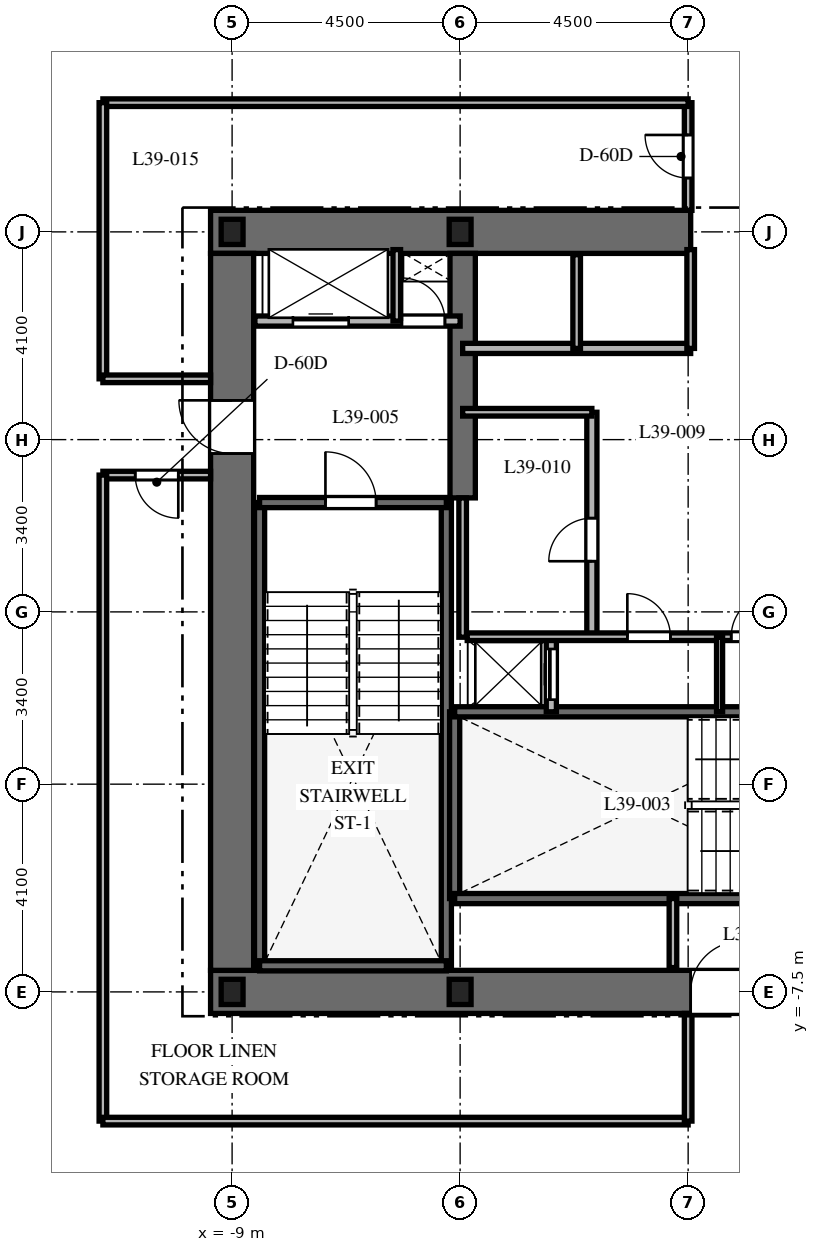
"""IFC4 building model, lengths in metres.
Left out: names, types, materials, properties, quantities, classifications, styles, units other than length and angle.
Written with IfcOpenShell. Run it as: python <this file> out.ifc"""

import sys

from ifc_helpers import new_model, si_unit, direction, frame, frame_2d, origin, origin_2d, place, context, subcontext, project, spatial, rectangle, i_section, extrude, element, fill, save


model = new_model("IFC4")
c1 = context("Model", 3, precision=1e-05, world=origin(), true_north=direction((0.0, 1.0)))
c2 = subcontext(c1, "Body", "Model", "MODEL_VIEW")
j1 = project(units=[si_unit("LENGTHUNIT", "METRE"), si_unit("PLANEANGLEUNIT", "RADIAN")], contexts=[c1])
p1 = place(None, origin())
s1 = spatial("IfcSite", under=j1, at=p1, CompositionType="ELEMENT")
p2 = place(p1, origin())
s2 = spatial("IfcBuilding", under=s1, at=p2, CompositionType="ELEMENT")
p3 = place(p2, frame((0.0, 0.0, 159.1)))
s3 = spatial("IfcBuildingStorey", under=s2, at=p3, CompositionType="ELEMENT", Elevation=159.1)
p4 = place(p3, frame((-9.425, -7.5, 0.0), z_axis=(0.0, 0.0, 1.0), x_axis=(1.0, 0.0, 0.0)))
e1 = element("IfcWall", 1, at=p4, inside=s3, PredefinedType="SHEAR", context=c2, shape_type="SweptSolid", body=[
    extrude(rectangle(XDim=18.85, YDim=0.85, at=frame_2d((9.425, 0.0))), origin(), (0.0, 0.0, 1.0), 3.7),
])
p5 = place(p4, frame((9.475, 0.0, 0.0)))
e2 = element("IfcOpeningElement", 2, at=p5, cuts=e1, PredefinedType="OPENING", context=c2, shape_type="SweptSolid", body=[
    extrude(rectangle(XDim=1.0, YDim=2.15, at=frame_2d((0.5, 1.075))), frame((0.0, 0.435, 0.0), z_axis=(0.0, -1.0, 0.0), x_axis=(1.0, 0.0, 0.0)), (0.0, 0.0, 1.0), 0.87),
])
p6 = place(p3, frame((-9.425, 7.5, 0.0), z_axis=(0.0, 0.0, 1.0), x_axis=(1.0, 0.0, 0.0)))
e3 = element("IfcWall", 3, at=p6, inside=s3, PredefinedType="SHEAR", context=c2, shape_type="SweptSolid", body=[
    extrude(rectangle(XDim=9.475, YDim=0.85, at=frame_2d((4.738, 0.0))), origin(), (0.0, 0.0, 1.0), 3.7),
])
p7 = place(p3, frame((-9.0, -7.075, 0.0), z_axis=(0.0, 0.0, 1.0), x_axis=(0.0, 1.0, 0.0)))
e4 = element("IfcWall", 4, at=p7, inside=s3, PredefinedType="SHEAR", context=c2, shape_type="SweptSolid", body=[
    extrude(rectangle(XDim=14.15, YDim=0.85, at=frame_2d((7.075, 0.0))), origin(), (0.0, 0.0, 1.0), 3.7),
])
p8 = place(p7, frame((10.2, 0.0, 0.0)))
e5 = element("IfcOpeningElement", 5, at=p8, cuts=e4, PredefinedType="OPENING", context=c2, shape_type="SweptSolid", body=[
    extrude(rectangle(XDim=1.05, YDim=2.15, at=frame_2d((0.525, 1.075))), frame((0.0, 0.435, 0.0), z_axis=(0.0, -1.0, 0.0), x_axis=(1.0, 0.0, 0.0)), (0.0, 0.0, 1.0), 0.87),
])
p9 = place(p3, frame((-4.45, 2.25, 0.0), z_axis=(0.0, 0.0, 1.0), x_axis=(0.0, 1.0, 0.0)))
e6 = element("IfcWall", 6, at=p9, inside=s3, PredefinedType="SHEAR", context=c2, shape_type="SweptSolid", body=[
    extrude(rectangle(XDim=4.825, YDim=0.5, at=frame_2d((2.413, 0.0))), origin(), (0.0, 0.0, 1.0), 3.7),
])
for number, where, z_axis, x_axis in (
    (7, (-8.458, -6.985, 0.0), (0.0, 0.0, 1.0), (0.0, 1.0, 0.0)),
    (8, (-4.772, -6.985, 0.0), (0.0, 0.0, 1.0), (0.0, 1.0, 0.0)),
):
    element("IfcWall", number, at=place(p3, frame(where, z_axis=z_axis, x_axis=x_axis)), inside=s3, PredefinedType="SHEAR", context=c2, shape_type="SweptSolid", body=[
        extrude(rectangle(XDim=9.143, YDim=0.2, at=frame_2d((4.572, 0.0))), origin(), (0.0, 0.0, 1.0), 3.7),
    ])
p10 = place(p3, frame((-8.458, -6.985, 0.0), z_axis=(0.0, 0.0, 1.0), x_axis=(1.0, 0.0, 0.0)))
e9 = element("IfcWall", 9, at=p10, inside=s3, PredefinedType="SHEAR", context=c2, shape_type="SweptSolid", body=[
    extrude(rectangle(XDim=3.686, YDim=0.2, at=frame_2d((1.843, 0.0))), origin(), (0.0, 0.0, 1.0), 3.7),
])
p11 = place(p3, frame((-8.458, 2.158, 0.0), z_axis=(0.0, 0.0, 1.0), x_axis=(1.0, 0.0, 0.0)))
e10 = element("IfcWall", 10, at=p11, inside=s3, PredefinedType="SHEAR", context=c2, shape_type="SweptSolid", body=[
    extrude(rectangle(XDim=3.686, YDim=0.2, at=frame_2d((1.843, 0.0))), origin(), (0.0, 0.0, 1.0), 3.7),
])
p12 = place(p11, frame((1.3, 0.0, 0.0)))
e11 = element("IfcOpeningElement", 11, at=p12, cuts=e10, PredefinedType="OPENING", context=c2, shape_type="SweptSolid", body=[
    extrude(rectangle(XDim=1.0, YDim=2.15, at=frame_2d((0.5, 1.075))), frame((0.0, 0.11, 0.0), z_axis=(0.0, -1.0, 0.0), x_axis=(1.0, 0.0, 0.0)), (0.0, 0.0, 1.0), 0.22),
])
p13 = place(p3, frame((-4.608, -5.658, 0.0), z_axis=(0.0, 0.0, 1.0), x_axis=(0.0, 1.0, 0.0)))
e12 = element("IfcWall", 12, at=p13, inside=s3, PredefinedType="SHEAR", context=c2, shape_type="SweptSolid", body=[
    extrude(rectangle(XDim=3.686, YDim=0.2, at=frame_2d((1.843, 0.0))), origin(), (0.0, 0.0, 1.0), 3.7),
])
p14 = place(p3, frame((-4.608, -5.658, 0.0), z_axis=(0.0, 0.0, 1.0), x_axis=(1.0, 0.0, 0.0)))
e13 = element("IfcWall", 13, at=p14, inside=s3, PredefinedType="SHEAR", context=c2, shape_type="SweptSolid", body=[
    extrude(rectangle(XDim=9.166, YDim=0.2, at=frame_2d((4.583, 0.0))), origin(), (0.0, 0.0, 1.0), 3.7),
])
p15 = place(p14, frame((7.45, 0.0, 0.0)))
e14 = element("IfcOpeningElement", 14, at=p15, cuts=e13, PredefinedType="OPENING", context=c2, shape_type="SweptSolid", body=[
    extrude(rectangle(XDim=1.0, YDim=2.15, at=frame_2d((0.5, 1.075))), frame((0.0, 0.11, 0.0), z_axis=(0.0, -1.0, 0.0), x_axis=(1.0, 0.0, 0.0)), (0.0, 0.0, 1.0), 0.22),
])
p16 = place(p3, frame((-4.608, -1.972, 0.0), z_axis=(0.0, 0.0, 1.0), x_axis=(1.0, 0.0, 0.0)))
e15 = element("IfcWall", 15, at=p16, inside=s3, PredefinedType="SHEAR", context=c2, shape_type="SweptSolid", body=[
    extrude(rectangle(XDim=9.166, YDim=0.2, at=frame_2d((4.583, 0.0))), origin(), (0.0, 0.0, 1.0), 3.7),
])
for number, where, z_axis, x_axis in (
    (16, (-9.0, -7.5, 0.0), (0.0, 0.0, 1.0), (1.0, 0.0, 0.0)),
    (17, (-4.5, -7.5, 0.0), (0.0, 0.0, 1.0), (1.0, 0.0, 0.0)),
    (18, (-4.5, 7.5, 0.0), (0.0, 0.0, 1.0), (1.0, 0.0, 0.0)),
    (19, (-9.0, 7.5, 0.0), (0.0, 0.0, 1.0), (1.0, 0.0, 0.0)),
):
    element("IfcColumn", number, at=place(p3, frame(where, z_axis=z_axis, x_axis=x_axis)), inside=s3, PredefinedType="COLUMN", context=c2, shape_type="SweptSolid", body=[
        extrude(i_section(OverallWidth=0.432, OverallDepth=0.498, WebThickness=0.056, FlangeThickness=0.089, at=origin_2d()), origin(), (0.0, 0.0, 1.0), 3.7),
    ])
p17 = place(p3, frame((-0.3, -7.02, 0.0), z_axis=(0.0, 0.0, 1.0), x_axis=(0.0, 1.0, 0.0)))
e20 = element("IfcWall", 20, at=p17, inside=s3, PredefinedType="PARTITIONING", context=c2, shape_type="SweptSolid", body=[
    extrude(rectangle(XDim=1.362, YDim=0.15, at=frame_2d((0.681, 0.0))), origin(), (0.0, 0.0, 1.0), 3.4),
])
p18 = place(p3, frame((-8.55, 5.74, 0.0), z_axis=(0.0, 0.0, 1.0), x_axis=(1.0, 0.0, 0.0)))
e21 = element("IfcWall", 21, at=p18, inside=s3, PredefinedType="PARTITIONING", context=c2, shape_type="SweptSolid", body=[
    extrude(rectangle(XDim=4.05, YDim=0.2, at=frame_2d((2.025, 0.0))), origin(), (0.0, 0.0, 1.0), 3.4),
])
p19 = place(p18, frame((0.75, 0.0, 0.0)))
e22 = element("IfcOpeningElement", 22, at=p19, cuts=e21, PredefinedType="OPENING", context=c2, shape_type="SweptSolid", body=[
    extrude(rectangle(XDim=1.1, YDim=2.2, at=frame_2d((0.55, 1.1))), frame((0.0, 0.11, 0.0), z_axis=(0.0, -1.0, 0.0), x_axis=(1.0, 0.0, 0.0)), (0.0, 0.0, 1.0), 0.22),
])
p20 = place(p18, frame((2.9, 0.0, 0.0)))
e23 = element("IfcOpeningElement", 23, at=p20, cuts=e21, PredefinedType="OPENING", context=c2, shape_type="SweptSolid", body=[
    extrude(rectangle(XDim=0.85, YDim=2.03, at=frame_2d((0.425, 1.015))), frame((0.0, 0.11, 0.0), z_axis=(0.0, -1.0, 0.0), x_axis=(1.0, 0.0, 0.0)), (0.0, 0.0, 1.0), 0.22),
])
p21 = place(p3, frame((-5.75, 5.74, 0.0), z_axis=(0.0, 0.0, 1.0), x_axis=(0.0, 1.0, 0.0)))
e24 = element("IfcWall", 24, at=p21, inside=s3, PredefinedType="PARTITIONING", context=c2, shape_type="SweptSolid", body=[
    extrude(rectangle(XDim=1.41, YDim=0.15, at=frame_2d((0.705, 0.0))), origin(), (0.0, 0.0, 1.0), 3.4),
])
p22 = place(p3, frame((-2.7, -1.972, 0.0), z_axis=(0.0, 0.0, 1.0), x_axis=(0.0, 1.0, 0.0)))
e25 = element("IfcWall", 25, at=p22, inside=s3, PredefinedType="PARTITIONING", context=c2, shape_type="SweptSolid", body=[
    extrude(rectangle(XDim=1.472, YDim=0.2, at=frame_2d((0.736, 0.0))), origin(), (0.0, 0.0, 1.0), 3.4),
])
p23 = place(p22, frame((0.24, 0.0, 0.0)))
e26 = element("IfcOpeningElement", 26, at=p23, cuts=e25, PredefinedType="OPENING", context=c2, shape_type="SweptSolid", body=[
    extrude(rectangle(XDim=1.0, YDim=2.2, at=frame_2d((0.5, 1.1))), frame((0.0, 0.11, 0.0), z_axis=(0.0, -1.0, 0.0), x_axis=(1.0, 0.0, 0.0)), (0.0, 0.0, 1.0), 0.22),
])
p24 = place(p3, frame((-4.45, 5.2, 0.0), z_axis=(0.0, 0.0, 1.0), x_axis=(1.0, 0.0, 0.0)))
e27 = element("IfcWall", 27, at=p24, inside=s3, PredefinedType="PARTITIONING", context=c2, shape_type="SweptSolid", body=[
    extrude(rectangle(XDim=4.5, YDim=0.2, at=frame_2d((2.25, 0.0))), origin(), (0.0, 0.0, 1.0), 3.4),
])
p25 = place(p3, frame((-2.2, 5.2, 0.0), z_axis=(0.0, 0.0, 1.0), x_axis=(0.0, 1.0, 0.0)))
e28 = element("IfcWall", 28, at=p25, inside=s3, PredefinedType="PARTITIONING", context=c2, shape_type="SweptSolid", body=[
    extrude(rectangle(XDim=1.85, YDim=0.15, at=frame_2d((0.925, 0.0))), origin(), (0.0, 0.0, 1.0), 3.4),
])
p26 = place(p3, frame((0.05, 5.2, 0.0), z_axis=(0.0, 0.0, 1.0), x_axis=(0.0, 1.0, 0.0)))
e29 = element("IfcWall", 29, at=p26, inside=s3, PredefinedType="PARTITIONING", context=c2, shape_type="SweptSolid", body=[
    extrude(rectangle(XDim=1.95, YDim=0.15, at=frame_2d((0.975, 0.0))), origin(), (0.0, 0.0, 1.0), 3.4),
])
p27 = place(p3, frame((-4.45, -0.5, 0.0), z_axis=(0.0, 0.0, 1.0), x_axis=(0.0, 1.0, 0.0)))
e30 = element("IfcWall", 30, at=p27, inside=s3, PredefinedType="PARTITIONING", context=c2, shape_type="SweptSolid", body=[
    extrude(rectangle(XDim=2.75, YDim=0.15, at=frame_2d((1.375, 0.0))), origin(), (0.0, 0.0, 1.0), 3.4),
])
p28 = place(p3, frame((-1.9, -0.5, 0.0), z_axis=(0.0, 0.0, 1.0), x_axis=(0.0, 1.0, 0.0)))
e31 = element("IfcWall", 31, at=p28, inside=s3, PredefinedType="PARTITIONING", context=c2, shape_type="SweptSolid", body=[
    extrude(rectangle(XDim=4.44, YDim=0.2, at=frame_2d((2.22, 0.0))), origin(), (0.0, 0.0, 1.0), 3.4),
])
p29 = place(p28, frame((1.5, 0.0, 0.0)))
e32 = element("IfcOpeningElement", 32, at=p29, cuts=e31, PredefinedType="OPENING", context=c2, shape_type="SweptSolid", body=[
    extrude(rectangle(XDim=0.85, YDim=2.03, at=frame_2d((0.425, 1.015))), frame((0.0, 0.11, 0.0), z_axis=(0.0, -1.0, 0.0), x_axis=(1.0, 0.0, 0.0)), (0.0, 0.0, 1.0), 0.22),
])
p30 = place(p3, frame((-4.45, 3.94, 0.0), z_axis=(0.0, 0.0, 1.0), x_axis=(1.0, 0.0, 0.0)))
e33 = element("IfcWall", 33, at=p30, inside=s3, PredefinedType="PARTITIONING", context=c2, shape_type="SweptSolid", body=[
    extrude(rectangle(XDim=2.55, YDim=0.15, at=frame_2d((1.275, 0.0))), origin(), (0.0, 0.0, 1.0), 3.4),
])
p31 = place(p3, frame((-4.36, -0.49, 0.0), z_axis=(0.0, 0.0, 1.0), x_axis=(1.0, 0.0, 0.0)))
e34 = element("IfcWall", 34, at=p31, inside=s3, PredefinedType="PARTITIONING", context=c2, shape_type="SweptSolid", body=[
    extrude(rectangle(XDim=8.72, YDim=0.15, at=frame_2d((4.36, 0.0))), origin(), (0.0, 0.0, 1.0), 3.4),
])
p32 = place(p31, frame((3.16, 0.0, 0.0)))
e35 = element("IfcOpeningElement", 35, at=p32, cuts=e34, PredefinedType="OPENING", context=c2, shape_type="SweptSolid", body=[
    extrude(rectangle(XDim=0.85, YDim=2.03, at=frame_2d((0.425, 1.015))), frame((0.0, 0.085, 0.0), z_axis=(0.0, -1.0, 0.0), x_axis=(1.0, 0.0, 0.0)), (0.0, 0.0, 1.0), 0.17),
])
p33 = place(p31, frame((5.21, 0.0, 0.0)))
e36 = element("IfcOpeningElement", 36, at=p33, cuts=e34, PredefinedType="OPENING", context=c2, shape_type="SweptSolid", body=[
    extrude(rectangle(XDim=0.85, YDim=2.03, at=frame_2d((0.425, 1.015))), frame((0.0, 0.085, 0.0), z_axis=(0.0, -1.0, 0.0), x_axis=(1.0, 0.0, 0.0)), (0.0, 0.0, 1.0), 0.17),
])
p34 = place(p3, frame((0.62, -1.972, 0.0), z_axis=(0.0, 0.0, 1.0), x_axis=(0.0, 1.0, 0.0)))
e37 = element("IfcWall", 37, at=p34, inside=s3, PredefinedType="PARTITIONING", context=c2, shape_type="SweptSolid", body=[
    extrude(rectangle(XDim=1.472, YDim=0.12, at=frame_2d((0.736, 0.0))), origin(), (0.0, 0.0, 1.0), 3.4),
])
p35 = place(p3, frame((0.0, 7.925, 0.0), z_axis=(0.0, 0.0, 1.0), x_axis=(0.0, 1.0, 0.0)))
e38 = element("IfcWall", 38, at=p35, inside=s3, PredefinedType="PARTITIONING", context=c2, shape_type="SweptSolid", body=[
    extrude(rectangle(XDim=2.125, YDim=0.15, at=frame_2d((1.062, 0.0))), origin(), (0.0, 0.0, 1.0), 3.4),
])
p36 = place(p35, frame((0.638, 0.0, 0.0)))
e39 = element("IfcOpeningElement", 39, at=p36, cuts=e38, PredefinedType="OPENING", context=c2, shape_type="SweptSolid", body=[
    extrude(rectangle(XDim=0.85, YDim=2.03, at=frame_2d((0.425, 1.015))), frame((0.0, 0.085, 0.0), z_axis=(0.0, -1.0, 0.0), x_axis=(1.0, 0.0, 0.0)), (0.0, 0.0, 1.0), 0.17),
])
p37 = place(p3, frame((0.0, 10.05, 0.0), z_axis=(0.0, 0.0, 1.0), x_axis=(-1.0, 0.0, 0.0)))
e40 = element("IfcWall", 40, at=p37, inside=s3, PredefinedType="PARTITIONING", context=c2, shape_type="SweptSolid", body=[
    extrude(rectangle(XDim=11.55, YDim=0.15, at=frame_2d((5.775, 0.0))), origin(), (0.0, 0.0, 1.0), 2.84),
])
p38 = place(p3, frame((-11.55, 10.05, 0.0), z_axis=(0.0, 0.0, 1.0), x_axis=(0.0, -1.0, 0.0)))
e41 = element("IfcWall", 41, at=p38, inside=s3, PredefinedType="PARTITIONING", context=c2, shape_type="SweptSolid", body=[
    extrude(rectangle(XDim=5.45, YDim=0.15, at=frame_2d((2.725, 0.0))), origin(), (0.0, 0.0, 1.0), 2.84),
])
p39 = place(p3, frame((-11.55, 4.6, 0.0), z_axis=(0.0, 0.0, 1.0), x_axis=(1.0, 0.0, 0.0)))
e42 = element("IfcWall", 42, at=p39, inside=s3, PredefinedType="PARTITIONING", context=c2, shape_type="SweptSolid", body=[
    extrude(rectangle(XDim=2.125, YDim=0.15, at=frame_2d((1.062, 0.0))), origin(), (0.0, 0.0, 1.0), 3.4),
])
p40 = place(p3, frame((-9.425, 2.7, 0.0), z_axis=(0.0, 0.0, 1.0), x_axis=(-1.0, 0.0, 0.0)))
e43 = element("IfcWall", 43, at=p40, inside=s3, PredefinedType="PARTITIONING", context=c2, shape_type="SweptSolid", body=[
    extrude(rectangle(XDim=2.125, YDim=0.15, at=frame_2d((1.062, 0.0))), origin(), (0.0, 0.0, 1.0), 3.4),
])
p41 = place(p40, frame((0.637, 0.0, 0.0)))
e44 = element("IfcOpeningElement", 44, at=p41, cuts=e43, PredefinedType="OPENING", context=c2, shape_type="SweptSolid", body=[
    extrude(rectangle(XDim=0.85, YDim=2.03, at=frame_2d((0.425, 1.015))), frame((0.0, 0.085, 0.0), z_axis=(0.0, -1.0, 0.0), x_axis=(1.0, 0.0, 0.0)), (0.0, 0.0, 1.0), 0.17),
])
p42 = place(p3, frame((-11.55, 2.7, 0.0), z_axis=(0.0, 0.0, 1.0), x_axis=(0.0, -1.0, 0.0)))
e45 = element("IfcWall", 45, at=p42, inside=s3, PredefinedType="PARTITIONING", context=c2, shape_type="SweptSolid", body=[
    extrude(rectangle(XDim=12.75, YDim=0.15, at=frame_2d((6.375, 0.0))), origin(), (0.0, 0.0, 1.0), 2.84),
])
p43 = place(p3, frame((-11.55, -10.05, 0.0), z_axis=(0.0, 0.0, 1.0), x_axis=(1.0, 0.0, 0.0)))
e46 = element("IfcWall", 46, at=p43, inside=s3, PredefinedType="PARTITIONING", context=c2, shape_type="SweptSolid", body=[
    extrude(rectangle(XDim=11.55, YDim=0.15, at=frame_2d((5.775, 0.0))), origin(), (0.0, 0.0, 1.0), 2.84),
])
p44 = place(p3, frame((0.0, -10.05, 0.0), z_axis=(0.0, 0.0, 1.0), x_axis=(0.0, 1.0, 0.0)))
e47 = element("IfcWall", 47, at=p44, inside=s3, PredefinedType="PARTITIONING", context=c2, shape_type="SweptSolid", body=[
    extrude(rectangle(XDim=2.125, YDim=0.15, at=frame_2d((1.062, 0.0))), origin(), (0.0, 0.0, 1.0), 3.4),
])
p45 = place(p12, origin())
e48 = element("IfcDoor", 48, at=p45, inside=s3, OperationType="SINGLE_SWING_LEFT", PredefinedType="DOOR", context=c2, shape_type="SweptSolid", body=[
    extrude(rectangle(XDim=1.0, YDim=2.15, at=frame_2d((0.5, 1.075))), frame((0.0, 0.025, 0.0), z_axis=(0.0, -1.0, 0.0), x_axis=(1.0, 0.0, 0.0)), (0.0, 0.0, 1.0), 0.05),
])
fill(e11, e48)
p46 = place(p5, origin())
e49 = element("IfcDoor", 49, at=p46, inside=s3, OperationType="SINGLE_SWING_RIGHT", PredefinedType="DOOR", context=c2, shape_type="SweptSolid", body=[
    extrude(rectangle(XDim=1.0, YDim=2.15, at=frame_2d((0.5, 1.075))), frame((0.0, 0.025, 0.0), z_axis=(0.0, -1.0, 0.0), x_axis=(1.0, 0.0, 0.0)), (0.0, 0.0, 1.0), 0.05),
])
fill(e2, e49)
p47 = place(p8, origin())
e50 = element("IfcDoor", 50, at=p47, inside=s3, OperationType="SINGLE_SWING_RIGHT", PredefinedType="DOOR", context=c2, shape_type="SweptSolid", body=[
    extrude(rectangle(XDim=1.05, YDim=2.15, at=frame_2d((0.525, 1.075))), frame((0.0, 0.025, 0.0), z_axis=(0.0, -1.0, 0.0), x_axis=(1.0, 0.0, 0.0)), (0.0, 0.0, 1.0), 0.05),
])
fill(e5, e50)
p48 = place(p19, origin())
e51 = element("IfcDoor", 51, at=p48, inside=s3, OperationType="SLIDING_TO_LEFT", PredefinedType="DOOR", context=c2, shape_type="SweptSolid", body=[
    extrude(rectangle(XDim=1.1, YDim=2.2, at=frame_2d((0.55, 1.1))), frame((0.0, 0.025, 0.0), z_axis=(0.0, -1.0, 0.0), x_axis=(1.0, 0.0, 0.0)), (0.0, 0.0, 1.0), 0.05),
])
fill(e22, e51)
p49 = place(p20, origin())
e52 = element("IfcDoor", 52, at=p49, inside=s3, OperationType="SINGLE_SWING_LEFT", PredefinedType="DOOR", context=c2, shape_type="SweptSolid", body=[
    extrude(rectangle(XDim=0.85, YDim=2.03, at=frame_2d((0.425, 1.015))), frame((0.0, 0.025, 0.0), z_axis=(0.0, -1.0, 0.0), x_axis=(1.0, 0.0, 0.0)), (0.0, 0.0, 1.0), 0.05),
])
fill(e23, e52)
p50 = place(p23, origin())
e53 = element("IfcDoor", 53, at=p50, inside=s3, OperationType="SLIDING_TO_LEFT", PredefinedType="DOOR", context=c2, shape_type="SweptSolid", body=[
    extrude(rectangle(XDim=1.0, YDim=2.2, at=frame_2d((0.5, 1.1))), frame((0.0, 0.025, 0.0), z_axis=(0.0, -1.0, 0.0), x_axis=(1.0, 0.0, 0.0)), (0.0, 0.0, 1.0), 0.05),
])
fill(e26, e53)
p51 = place(p29, origin())
e54 = element("IfcDoor", 54, at=p51, inside=s3, OperationType="SINGLE_SWING_LEFT", PredefinedType="DOOR", context=c2, shape_type="SweptSolid", body=[
    extrude(rectangle(XDim=0.85, YDim=2.03, at=frame_2d((0.425, 1.015))), frame((0.0, 0.025, 0.0), z_axis=(0.0, -1.0, 0.0), x_axis=(1.0, 0.0, 0.0)), (0.0, 0.0, 1.0), 0.05),
])
fill(e32, e54)
p52 = place(p32, origin())
e55 = element("IfcDoor", 55, at=p52, inside=s3, OperationType="SINGLE_SWING_LEFT", PredefinedType="DOOR", context=c2, shape_type="SweptSolid", body=[
    extrude(rectangle(XDim=0.85, YDim=2.03, at=frame_2d((0.425, 1.015))), frame((0.0, 0.025, 0.0), z_axis=(0.0, -1.0, 0.0), x_axis=(1.0, 0.0, 0.0)), (0.0, 0.0, 1.0), 0.05),
])
fill(e35, e55)
p53 = place(p33, origin())
e56 = element("IfcDoor", 56, at=p53, inside=s3, OperationType="SINGLE_SWING_RIGHT", PredefinedType="DOOR", context=c2, shape_type="SweptSolid", body=[
    extrude(rectangle(XDim=0.85, YDim=2.03, at=frame_2d((0.425, 1.015))), frame((0.0, 0.025, 0.0), z_axis=(0.0, -1.0, 0.0), x_axis=(1.0, 0.0, 0.0)), (0.0, 0.0, 1.0), 0.05),
])
fill(e36, e56)
p54 = place(p41, origin())
e57 = element("IfcDoor", 57, at=p54, inside=s3, OperationType="SINGLE_SWING_LEFT", PredefinedType="DOOR", context=c2, shape_type="SweptSolid", body=[
    extrude(rectangle(XDim=0.85, YDim=2.03, at=frame_2d((0.425, 1.015))), frame((0.0, 0.025, 0.0), z_axis=(0.0, -1.0, 0.0), x_axis=(1.0, 0.0, 0.0)), (0.0, 0.0, 1.0), 0.05),
])
fill(e44, e57)
p55 = place(p36, origin())
e58 = element("IfcDoor", 58, at=p55, inside=s3, OperationType="SINGLE_SWING_RIGHT", PredefinedType="DOOR", context=c2, shape_type="SweptSolid", body=[
    extrude(rectangle(XDim=0.85, YDim=2.03, at=frame_2d((0.425, 1.015))), frame((0.0, 0.025, 0.0), z_axis=(0.0, -1.0, 0.0), x_axis=(1.0, 0.0, 0.0)), (0.0, 0.0, 1.0), 0.05),
])
fill(e39, e58)
save(model, sys.argv[1])
